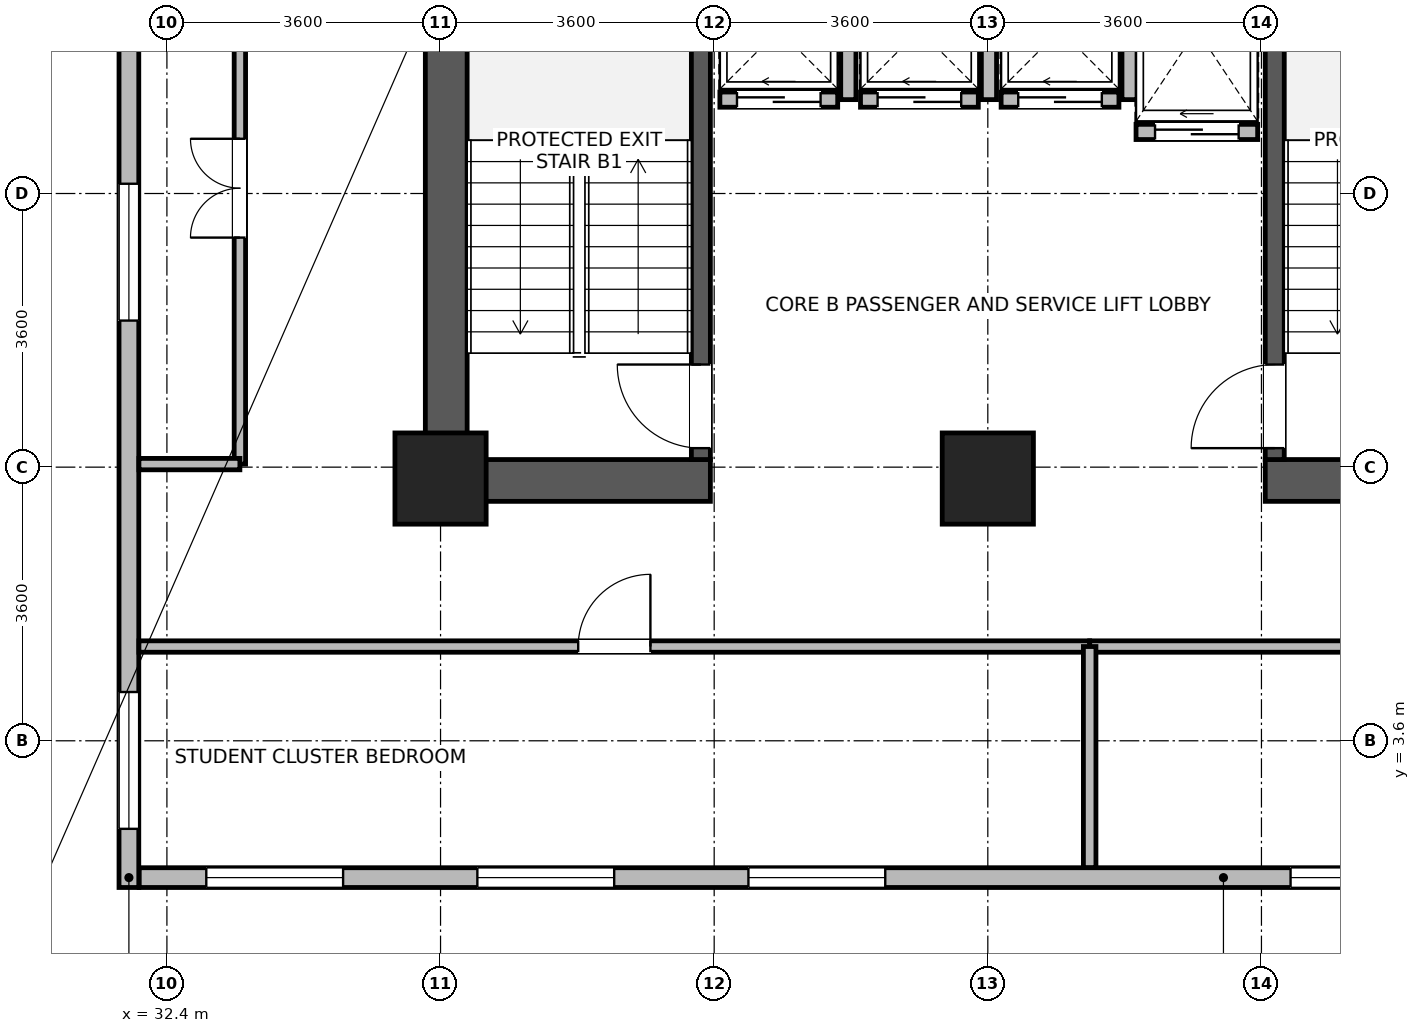
"""IFC4 building model, lengths in metres.
Left out: names, types, materials, properties, quantities, classifications, styles, units other than length and angle.
Written with IfcOpenShell. Run it as: python <this file> out.ifc"""

import sys

from ifc_helpers import new_model, si_unit, direction, frame, frame_2d, origin, origin_2d, place, context, subcontext, project, spatial, rectangle, extrude, source, transform, mapped, element, fill, save


model = new_model("IFC4")
c1 = context("Model", 3, precision=1e-05, world=origin(), true_north=direction((0.0, 1.0)))
c2 = subcontext(c1, "Body", "Model", "MODEL_VIEW")
j1 = project(units=[si_unit("LENGTHUNIT", "METRE"), si_unit("PLANEANGLEUNIT", "RADIAN")], contexts=[c1])
p1 = place(None, origin())
s1 = spatial("IfcSite", under=j1, at=p1, CompositionType="ELEMENT")
p2 = place(p1, origin())
s2 = spatial("IfcBuilding", under=s1, at=p2, CompositionType="ELEMENT")
p3 = place(p2, frame((0.0, 0.0, 89.7)))
s3 = spatial("IfcBuildingStorey", under=s2, at=p3, CompositionType="ELEMENT", Elevation=89.7)
p4 = place(p3, frame((36.075, 6.75, 0.0), z_axis=(0.0, 0.0, 1.0), x_axis=(0.0, 1.0, 0.0)))
e1 = element("IfcWall", 1, at=p4, inside=s3, PredefinedType="SHEAR", context=c2, shape_type="SweptSolid", body=[
    extrude(rectangle(XDim=8.1, YDim=0.55, at=frame_2d((4.05, 0.0))), origin(), (0.0, 0.0, 1.0), 3.45),
])
for number, where, z_axis, x_axis in (
    (2, (36.35, 7.025, 0.0), (0.0, 0.0, 1.0), (1.0, 0.0, 0.0)),
    (3, (46.85, 7.025, 0.0), (0.0, 0.0, 1.0), (1.0, 0.0, 0.0)),
):
    element("IfcWall", number, at=place(p3, frame(where, z_axis=z_axis, x_axis=x_axis)), inside=s3, PredefinedType="SHEAR", context=c2, shape_type="SweptSolid", body=[
        extrude(rectangle(XDim=3.2, YDim=0.55, at=frame_2d((1.6, 0.0))), origin(), (0.0, 0.0, 1.0), 3.45),
    ])
p5 = place(p3, frame((39.425, 7.3, 0.0), z_axis=(0.0, 0.0, 1.0), x_axis=(0.0, 1.0, 0.0)))
e4 = element("IfcWall", 4, at=p5, inside=s3, PredefinedType="SHEAR", context=c2, shape_type="SweptSolid", body=[
    extrude(rectangle(XDim=7.0, YDim=0.25, at=frame_2d((3.5, 0.0))), origin(), (0.0, 0.0, 1.0), 3.45),
])
p6 = place(p5, frame((0.15, 0.0, 0.0)))
e5 = element("IfcOpeningElement", 5, at=p6, cuts=e4, PredefinedType="OPENING", context=c2, shape_type="SweptSolid", body=[
    extrude(rectangle(XDim=1.1, YDim=2.08, at=frame_2d((0.55, 1.04))), frame((0.0, 0.135, 0.0), z_axis=(0.0, -1.0, 0.0), x_axis=(1.0, 0.0, 0.0)), (0.0, 0.0, 1.0), 0.27),
])
p7 = place(p3, frame((46.975, 7.3, 0.0), z_axis=(0.0, 0.0, 1.0), x_axis=(0.0, 1.0, 0.0)))
e6 = element("IfcWall", 6, at=p7, inside=s3, PredefinedType="SHEAR", context=c2, shape_type="SweptSolid", body=[
    extrude(rectangle(XDim=7.0, YDim=0.25, at=frame_2d((3.5, 0.0))), origin(), (0.0, 0.0, 1.0), 3.45),
])
p8 = place(p7, frame((0.15, 0.0, 0.0)))
e7 = element("IfcOpeningElement", 7, at=p8, cuts=e6, PredefinedType="OPENING", context=c2, shape_type="SweptSolid", body=[
    extrude(rectangle(XDim=1.1, YDim=2.08, at=frame_2d((0.55, 1.04))), frame((0.0, 0.135, 0.0), z_axis=(0.0, -1.0, 0.0), x_axis=(1.0, 0.0, 0.0)), (0.0, 0.0, 1.0), 0.27),
])
m1 = source(origin(), c2, "Body", "SweptSolid", [
    extrude(rectangle(XDim=1.2, YDim=1.2, at=origin_2d()), origin(), (0.0, 0.0, 1.0), 3.7),
])
for number, where, z_axis, x_axis in (
    (8, (36.0, 7.05, 0.0), (0.0, 0.0, 1.0), (1.0, 0.0, 0.0)),
    (9, (43.2, 7.05, 0.0), (0.0, 0.0, 1.0), (1.0, 0.0, 0.0)),
):
    element("IfcColumn", number, at=place(p3, frame(where, z_axis=z_axis, x_axis=x_axis)), inside=s3, PredefinedType="COLUMN", context=c2, shape_type="MappedRepresentation", body=[
        mapped(m1, transform((0.0, 0.0, 0.0), x_axis=(1.0, 0.0, 0.0), y_axis=(0.0, 1.0, 0.0), z_axis=(0.0, 0.0, 1.0), scale=1.0)),
    ])
p9 = place(p3, frame((60.565, 1.8, 0.0), z_axis=(0.0, 0.0, 1.0), x_axis=(-1.0, 0.0, 0.0)))
e10 = element("IfcWall", 10, at=p9, inside=s3, PredefinedType="STANDARD", context=c2, shape_type="SweptSolid", body=[
    extrude(rectangle(XDim=28.53, YDim=0.26, at=frame_2d((14.265, 0.0))), origin(), (0.0, 0.0, 1.0), 3.43),
])
p10 = place(p9, frame((4.449, 0.0, 0.85)))
e11 = element("IfcOpeningElement", 11, at=p10, cuts=e10, PredefinedType="OPENING", context=c2, shape_type="SweptSolid", body=[
    extrude(rectangle(XDim=1.8, YDim=1.85, at=frame_2d((0.9, 0.925))), frame((0.0, 0.14, 0.0), z_axis=(0.0, -1.0, 0.0), x_axis=(1.0, 0.0, 0.0)), (0.0, 0.0, 1.0), 0.28),
])
p11 = place(p9, frame((8.016, 0.0, 0.85)))
e12 = element("IfcOpeningElement", 12, at=p11, cuts=e10, PredefinedType="OPENING", context=c2, shape_type="SweptSolid", body=[
    extrude(rectangle(XDim=1.8, YDim=1.85, at=frame_2d((0.9, 0.925))), frame((0.0, 0.14, 0.0), z_axis=(0.0, -1.0, 0.0), x_axis=(1.0, 0.0, 0.0)), (0.0, 0.0, 1.0), 0.28),
])
p12 = place(p9, frame((11.582, 0.0, 0.85)))
e13 = element("IfcOpeningElement", 13, at=p12, cuts=e10, PredefinedType="OPENING", context=c2, shape_type="SweptSolid", body=[
    extrude(rectangle(XDim=1.8, YDim=1.85, at=frame_2d((0.9, 0.925))), frame((0.0, 0.14, 0.0), z_axis=(0.0, -1.0, 0.0), x_axis=(1.0, 0.0, 0.0)), (0.0, 0.0, 1.0), 0.28),
])
p13 = place(p9, frame((18.714, 0.0, 0.85)))
e14 = element("IfcOpeningElement", 14, at=p13, cuts=e10, PredefinedType="OPENING", context=c2, shape_type="SweptSolid", body=[
    extrude(rectangle(XDim=1.8, YDim=1.85, at=frame_2d((0.9, 0.925))), frame((0.0, 0.14, 0.0), z_axis=(0.0, -1.0, 0.0), x_axis=(1.0, 0.0, 0.0)), (0.0, 0.0, 1.0), 0.28),
])
p14 = place(p9, frame((22.281, 0.0, 0.85)))
e15 = element("IfcOpeningElement", 15, at=p14, cuts=e10, PredefinedType="OPENING", context=c2, shape_type="SweptSolid", body=[
    extrude(rectangle(XDim=1.8, YDim=1.85, at=frame_2d((0.9, 0.925))), frame((0.0, 0.14, 0.0), z_axis=(0.0, -1.0, 0.0), x_axis=(1.0, 0.0, 0.0)), (0.0, 0.0, 1.0), 0.28),
])
p15 = place(p9, frame((25.847, 0.0, 0.85)))
e16 = element("IfcOpeningElement", 16, at=p15, cuts=e10, PredefinedType="OPENING", context=c2, shape_type="SweptSolid", body=[
    extrude(rectangle(XDim=1.8, YDim=1.85, at=frame_2d((0.9, 0.925))), frame((0.0, 0.14, 0.0), z_axis=(0.0, -1.0, 0.0), x_axis=(1.0, 0.0, 0.0)), (0.0, 0.0, 1.0), 0.28),
])
p16 = place(p3, frame((31.9, 1.67, 0.0), z_axis=(0.0, 0.0, 1.0), x_axis=(0.0, 1.0, 0.0)))
e17 = element("IfcWall", 17, at=p16, inside=s3, PredefinedType="STANDARD", context=c2, shape_type="SweptSolid", body=[
    extrude(rectangle(XDim=20.06, YDim=0.26, at=frame_2d((10.03, 0.0))), origin(), (0.0, 0.0, 1.0), 3.43),
])
p17 = place(p16, frame((0.772, 0.0, 0.85)))
e18 = element("IfcOpeningElement", 18, at=p17, cuts=e17, PredefinedType="OPENING", context=c2, shape_type="SweptSolid", body=[
    extrude(rectangle(XDim=1.8, YDim=1.85, at=frame_2d((0.9, 0.925))), frame((0.0, 0.14, 0.0), z_axis=(0.0, -1.0, 0.0), x_axis=(1.0, 0.0, 0.0)), (0.0, 0.0, 1.0), 0.28),
])
p18 = place(p16, frame((7.458, 0.0, 0.85)))
e19 = element("IfcOpeningElement", 19, at=p18, cuts=e17, PredefinedType="OPENING", context=c2, shape_type="SweptSolid", body=[
    extrude(rectangle(XDim=1.8, YDim=1.85, at=frame_2d((0.9, 0.925))), frame((0.0, 0.14, 0.0), z_axis=(0.0, -1.0, 0.0), x_axis=(1.0, 0.0, 0.0)), (0.0, 0.0, 1.0), 0.28),
])
p19 = place(p16, frame((14.145, 0.0, 0.85)))
e20 = element("IfcOpeningElement", 20, at=p19, cuts=e17, PredefinedType="OPENING", context=c2, shape_type="SweptSolid", body=[
    extrude(rectangle(XDim=1.8, YDim=1.85, at=frame_2d((0.9, 0.925))), frame((0.0, 0.14, 0.0), z_axis=(0.0, -1.0, 0.0), x_axis=(1.0, 0.0, 0.0)), (0.0, 0.0, 1.0), 0.28),
])
p20 = place(p16, frame((17.488, 0.0, 0.85)))
e21 = element("IfcOpeningElement", 21, at=p20, cuts=e17, PredefinedType="OPENING", context=c2, shape_type="SweptSolid", body=[
    extrude(rectangle(XDim=1.8, YDim=1.85, at=frame_2d((0.9, 0.925))), frame((0.0, 0.14, 0.0), z_axis=(0.0, -1.0, 0.0), x_axis=(1.0, 0.0, 0.0)), (0.0, 0.0, 1.0), 0.28),
])
p21 = place(p3, frame((39.675, 12.035, 0.0), z_axis=(0.0, 0.0, 1.0), x_axis=(1.0, 0.0, 0.0)))
e22 = element("IfcWall", 22, at=p21, inside=s3, PredefinedType="PARTITIONING", context=c2, shape_type="SweptSolid", body=[
    extrude(rectangle(XDim=1.55, YDim=0.2, at=frame_2d((0.775, 0.0))), origin(), (0.0, 0.0, 1.0), 3.43),
])
p22 = place(p21, frame((0.225, 0.0, 0.0)))
e23 = element("IfcOpeningElement", 23, at=p22, cuts=e22, PredefinedType="OPENING", context=c2, shape_type="SweptSolid", body=[
    extrude(rectangle(XDim=1.1, YDim=2.12, at=frame_2d((0.55, 1.06))), frame((0.0, 0.11, 0.0), z_axis=(0.0, -1.0, 0.0), x_axis=(1.0, 0.0, 0.0)), (0.0, 0.0, 1.0), 0.22),
])
p23 = place(p3, frame((41.365, 12.035, 0.0), z_axis=(0.0, 0.0, 1.0), x_axis=(0.0, 1.0, 0.0)))
e24 = element("IfcWall", 24, at=p23, inside=s3, PredefinedType="PARTITIONING", context=c2, shape_type="SweptSolid", body=[
    extrude(rectangle(XDim=1.83, YDim=0.2, at=frame_2d((0.915, 0.0))), origin(), (0.0, 0.0, 1.0), 3.43),
])
p24 = place(p3, frame((41.525, 12.035, 0.0), z_axis=(0.0, 0.0, 1.0), x_axis=(1.0, 0.0, 0.0)))
e25 = element("IfcWall", 25, at=p24, inside=s3, PredefinedType="PARTITIONING", context=c2, shape_type="SweptSolid", body=[
    extrude(rectangle(XDim=1.55, YDim=0.2, at=frame_2d((0.775, 0.0))), origin(), (0.0, 0.0, 1.0), 3.43),
])
p25 = place(p24, frame((0.225, 0.0, 0.0)))
e26 = element("IfcOpeningElement", 26, at=p25, cuts=e25, PredefinedType="OPENING", context=c2, shape_type="SweptSolid", body=[
    extrude(rectangle(XDim=1.1, YDim=2.12, at=frame_2d((0.55, 1.06))), frame((0.0, 0.11, 0.0), z_axis=(0.0, -1.0, 0.0), x_axis=(1.0, 0.0, 0.0)), (0.0, 0.0, 1.0), 0.22),
])
p26 = place(p3, frame((43.215, 12.035, 0.0), z_axis=(0.0, 0.0, 1.0), x_axis=(0.0, 1.0, 0.0)))
e27 = element("IfcWall", 27, at=p26, inside=s3, PredefinedType="PARTITIONING", context=c2, shape_type="SweptSolid", body=[
    extrude(rectangle(XDim=1.83, YDim=0.2, at=frame_2d((0.915, 0.0))), origin(), (0.0, 0.0, 1.0), 3.43),
])
p27 = place(p3, frame((43.375, 12.035, 0.0), z_axis=(0.0, 0.0, 1.0), x_axis=(1.0, 0.0, 0.0)))
e28 = element("IfcWall", 28, at=p27, inside=s3, PredefinedType="PARTITIONING", context=c2, shape_type="SweptSolid", body=[
    extrude(rectangle(XDim=1.55, YDim=0.2, at=frame_2d((0.775, 0.0))), origin(), (0.0, 0.0, 1.0), 3.43),
])
p28 = place(p27, frame((0.225, 0.0, 0.0)))
e29 = element("IfcOpeningElement", 29, at=p28, cuts=e28, PredefinedType="OPENING", context=c2, shape_type="SweptSolid", body=[
    extrude(rectangle(XDim=1.1, YDim=2.12, at=frame_2d((0.55, 1.06))), frame((0.0, 0.11, 0.0), z_axis=(0.0, -1.0, 0.0), x_axis=(1.0, 0.0, 0.0)), (0.0, 0.0, 1.0), 0.22),
])
p29 = place(p3, frame((45.065, 12.035, 0.0), z_axis=(0.0, 0.0, 1.0), x_axis=(0.0, 1.0, 0.0)))
e30 = element("IfcWall", 30, at=p29, inside=s3, PredefinedType="PARTITIONING", context=c2, shape_type="SweptSolid", body=[
    extrude(rectangle(XDim=1.83, YDim=0.2, at=frame_2d((0.915, 0.0))), origin(), (0.0, 0.0, 1.0), 3.43),
])
p30 = place(p3, frame((45.15, 11.61, 0.0), z_axis=(0.0, 0.0, 1.0), x_axis=(1.0, 0.0, 0.0)))
e31 = element("IfcWall", 31, at=p30, inside=s3, PredefinedType="PARTITIONING", context=c2, shape_type="SweptSolid", body=[
    extrude(rectangle(XDim=1.6, YDim=0.2, at=frame_2d((0.8, 0.0))), origin(), (0.0, 0.0, 1.0), 3.43),
])
p31 = place(p30, frame((0.25, 0.0, 0.0)))
e32 = element("IfcOpeningElement", 32, at=p31, cuts=e31, PredefinedType="OPENING", context=c2, shape_type="SweptSolid", body=[
    extrude(rectangle(XDim=1.1, YDim=2.12, at=frame_2d((0.55, 1.06))), frame((0.0, 0.11, 0.0), z_axis=(0.0, -1.0, 0.0), x_axis=(1.0, 0.0, 0.0)), (0.0, 0.0, 1.0), 0.22),
])
p32 = place(p3, frame((44.54, 4.84, 0.0), z_axis=(0.0, 0.0, 1.0), x_axis=(1.0, 0.0, 0.0)))
e33 = element("IfcWall", 33, at=p32, inside=s3, PredefinedType="PARTITIONING", context=c2, shape_type="SweptSolid", body=[
    extrude(rectangle(XDim=13.62, YDim=0.15, at=frame_2d((6.81, 0.0))), origin(), (0.0, 0.0, 1.0), 3.43),
])
p33 = place(p32, frame((6.335, 0.0, 0.0)))
e34 = element("IfcOpeningElement", 34, at=p33, cuts=e33, PredefinedType="OPENING", context=c2, shape_type="SweptSolid", body=[
    extrude(rectangle(XDim=0.95, YDim=2.1, at=frame_2d((0.475, 1.05))), frame((0.0, 0.085, 0.0), z_axis=(0.0, -1.0, 0.0), x_axis=(1.0, 0.0, 0.0)), (0.0, 0.0, 1.0), 0.17),
])
p34 = place(p3, frame((32.032, 4.84, 0.0), z_axis=(0.0, 0.0, 1.0), x_axis=(1.0, 0.0, 0.0)))
e35 = element("IfcWall", 35, at=p34, inside=s3, PredefinedType="PARTITIONING", context=c2, shape_type="SweptSolid", body=[
    extrude(rectangle(XDim=12.508, YDim=0.15, at=frame_2d((6.254, 0.0))), origin(), (0.0, 0.0, 1.0), 3.43),
])
p35 = place(p34, frame((5.779, 0.0, 0.0)))
e36 = element("IfcOpeningElement", 36, at=p35, cuts=e35, PredefinedType="OPENING", context=c2, shape_type="SweptSolid", body=[
    extrude(rectangle(XDim=0.95, YDim=2.1, at=frame_2d((0.475, 1.05))), frame((0.0, 0.085, 0.0), z_axis=(0.0, -1.0, 0.0), x_axis=(1.0, 0.0, 0.0)), (0.0, 0.0, 1.0), 0.17),
])
p36 = place(p3, frame((33.36, 7.24, 0.0), z_axis=(0.0, 0.0, 1.0), x_axis=(0.0, 1.0, 0.0)))
e37 = element("IfcWall", 37, at=p36, inside=s3, PredefinedType="PARTITIONING", context=c2, shape_type="SweptSolid", body=[
    extrude(rectangle(XDim=7.26, YDim=0.15, at=frame_2d((3.63, 0.0))), origin(), (0.0, 0.0, 1.0), 3.43),
])
p37 = place(p36, frame((2.98, 0.0, 0.0)))
e38 = element("IfcOpeningElement", 38, at=p37, cuts=e37, PredefinedType="OPENING", context=c2, shape_type="SweptSolid", body=[
    extrude(rectangle(XDim=1.3, YDim=2.12, at=frame_2d((0.65, 1.06))), frame((0.0, 0.085, 0.0), z_axis=(0.0, -1.0, 0.0), x_axis=(1.0, 0.0, 0.0)), (0.0, 0.0, 1.0), 0.17),
])
p38 = place(p3, frame((32.032, 7.24, 0.0), z_axis=(0.0, 0.0, 1.0), x_axis=(1.0, 0.0, 0.0)))
e39 = element("IfcWall", 39, at=p38, inside=s3, PredefinedType="PARTITIONING", context=c2, shape_type="SweptSolid", body=[
    extrude(rectangle(XDim=1.328, YDim=0.15, at=frame_2d((0.664, 0.0))), origin(), (0.0, 0.0, 1.0), 3.43),
])
p39 = place(p3, frame((44.54, 1.932, 0.0), z_axis=(0.0, 0.0, 1.0), x_axis=(0.0, 1.0, 0.0)))
e40 = element("IfcWall", 40, at=p39, inside=s3, PredefinedType="PARTITIONING", context=c2, shape_type="SweptSolid", body=[
    extrude(rectangle(XDim=2.908, YDim=0.165, at=frame_2d((1.454, 0.0))), origin(), (0.0, 0.0, 1.0), 3.43),
])
p40 = place(p12, origin())
e41 = element("IfcWindow", 41, at=p40, inside=s3, PartitioningType="SINGLE_PANEL", PredefinedType="WINDOW", context=c2, shape_type="SweptSolid", body=[
    extrude(rectangle(XDim=1.8, YDim=1.85, at=frame_2d((0.9, 0.925))), frame((0.0, 0.03, 0.0), z_axis=(0.0, -1.0, 0.0), x_axis=(1.0, 0.0, 0.0)), (0.0, 0.0, 1.0), 0.06),
])
fill(e13, e41)
p41 = place(p13, origin())
e42 = element("IfcWindow", 42, at=p41, inside=s3, PartitioningType="SINGLE_PANEL", PredefinedType="WINDOW", context=c2, shape_type="SweptSolid", body=[
    extrude(rectangle(XDim=1.8, YDim=1.85, at=frame_2d((0.9, 0.925))), frame((0.0, 0.03, 0.0), z_axis=(0.0, -1.0, 0.0), x_axis=(1.0, 0.0, 0.0)), (0.0, 0.0, 1.0), 0.06),
])
fill(e14, e42)
p42 = place(p14, origin())
e43 = element("IfcWindow", 43, at=p42, inside=s3, PartitioningType="SINGLE_PANEL", PredefinedType="WINDOW", context=c2, shape_type="SweptSolid", body=[
    extrude(rectangle(XDim=1.8, YDim=1.85, at=frame_2d((0.9, 0.925))), frame((0.0, 0.03, 0.0), z_axis=(0.0, -1.0, 0.0), x_axis=(1.0, 0.0, 0.0)), (0.0, 0.0, 1.0), 0.06),
])
fill(e15, e43)
p43 = place(p15, origin())
e44 = element("IfcWindow", 44, at=p43, inside=s3, PartitioningType="SINGLE_PANEL", PredefinedType="WINDOW", context=c2, shape_type="SweptSolid", body=[
    extrude(rectangle(XDim=1.8, YDim=1.85, at=frame_2d((0.9, 0.925))), frame((0.0, 0.03, 0.0), z_axis=(0.0, -1.0, 0.0), x_axis=(1.0, 0.0, 0.0)), (0.0, 0.0, 1.0), 0.06),
])
fill(e16, e44)
p44 = place(p17, origin())
e45 = element("IfcWindow", 45, at=p44, inside=s3, PartitioningType="SINGLE_PANEL", PredefinedType="WINDOW", context=c2, shape_type="SweptSolid", body=[
    extrude(rectangle(XDim=1.8, YDim=1.85, at=frame_2d((0.9, 0.925))), frame((0.0, 0.03, 0.0), z_axis=(0.0, -1.0, 0.0), x_axis=(1.0, 0.0, 0.0)), (0.0, 0.0, 1.0), 0.06),
])
fill(e18, e45)
p45 = place(p18, origin())
e46 = element("IfcWindow", 46, at=p45, inside=s3, PartitioningType="SINGLE_PANEL", PredefinedType="WINDOW", context=c2, shape_type="SweptSolid", body=[
    extrude(rectangle(XDim=1.8, YDim=1.85, at=frame_2d((0.9, 0.925))), frame((0.0, 0.03, 0.0), z_axis=(0.0, -1.0, 0.0), x_axis=(1.0, 0.0, 0.0)), (0.0, 0.0, 1.0), 0.06),
])
fill(e19, e46)
p46 = place(p6, origin())
e47 = element("IfcDoor", 47, at=p46, inside=s3, OperationType="SINGLE_SWING_RIGHT", PredefinedType="DOOR", context=c2, shape_type="SweptSolid", body=[
    extrude(rectangle(XDim=1.1, YDim=2.08, at=frame_2d((0.55, 1.04))), frame((0.0, 0.025, 0.0), z_axis=(0.0, -1.0, 0.0), x_axis=(1.0, 0.0, 0.0)), (0.0, 0.0, 1.0), 0.05),
])
fill(e5, e47)
p47 = place(p8, origin())
e48 = element("IfcDoor", 48, at=p47, inside=s3, OperationType="SINGLE_SWING_LEFT", PredefinedType="DOOR", context=c2, shape_type="SweptSolid", body=[
    extrude(rectangle(XDim=1.1, YDim=2.08, at=frame_2d((0.55, 1.04))), frame((0.0, 0.025, 0.0), z_axis=(0.0, -1.0, 0.0), x_axis=(1.0, 0.0, 0.0)), (0.0, 0.0, 1.0), 0.05),
])
fill(e7, e48)
p48 = place(p22, origin())
e49 = element("IfcDoor", 49, at=p48, inside=s3, OperationType="SLIDING_TO_LEFT", PredefinedType="DOOR", context=c2, shape_type="SweptSolid", body=[
    extrude(rectangle(XDim=1.1, YDim=2.12, at=frame_2d((0.55, 1.06))), frame((0.0, 0.025, 0.0), z_axis=(0.0, -1.0, 0.0), x_axis=(1.0, 0.0, 0.0)), (0.0, 0.0, 1.0), 0.05),
])
fill(e23, e49)
p49 = place(p25, origin())
e50 = element("IfcDoor", 50, at=p49, inside=s3, OperationType="SLIDING_TO_LEFT", PredefinedType="DOOR", context=c2, shape_type="SweptSolid", body=[
    extrude(rectangle(XDim=1.1, YDim=2.12, at=frame_2d((0.55, 1.06))), frame((0.0, 0.025, 0.0), z_axis=(0.0, -1.0, 0.0), x_axis=(1.0, 0.0, 0.0)), (0.0, 0.0, 1.0), 0.05),
])
fill(e26, e50)
p50 = place(p28, origin())
e51 = element("IfcDoor", 51, at=p50, inside=s3, OperationType="SLIDING_TO_LEFT", PredefinedType="DOOR", context=c2, shape_type="SweptSolid", body=[
    extrude(rectangle(XDim=1.1, YDim=2.12, at=frame_2d((0.55, 1.06))), frame((0.0, 0.025, 0.0), z_axis=(0.0, -1.0, 0.0), x_axis=(1.0, 0.0, 0.0)), (0.0, 0.0, 1.0), 0.05),
])
fill(e29, e51)
p51 = place(p31, origin())
e52 = element("IfcDoor", 52, at=p51, inside=s3, OperationType="SLIDING_TO_LEFT", PredefinedType="DOOR", context=c2, shape_type="SweptSolid", body=[
    extrude(rectangle(XDim=1.1, YDim=2.12, at=frame_2d((0.55, 1.06))), frame((0.0, 0.025, 0.0), z_axis=(0.0, -1.0, 0.0), x_axis=(1.0, 0.0, 0.0)), (0.0, 0.0, 1.0), 0.05),
])
fill(e32, e52)
p52 = place(p35, origin())
e53 = element("IfcDoor", 53, at=p52, inside=s3, OperationType="SINGLE_SWING_RIGHT", PredefinedType="DOOR", context=c2, shape_type="SweptSolid", body=[
    extrude(rectangle(XDim=0.95, YDim=2.1, at=frame_2d((0.475, 1.05))), frame((0.0, 0.025, 0.0), z_axis=(0.0, -1.0, 0.0), x_axis=(1.0, 0.0, 0.0)), (0.0, 0.0, 1.0), 0.05),
])
fill(e36, e53)
p53 = place(p37, origin())
e54 = element("IfcDoor", 54, at=p53, inside=s3, OperationType="DOUBLE_DOOR_SINGLE_SWING", PredefinedType="DOOR", context=c2, shape_type="SweptSolid", body=[
    extrude(rectangle(XDim=1.3, YDim=2.12, at=frame_2d((0.65, 1.06))), frame((0.0, 0.025, 0.0), z_axis=(0.0, -1.0, 0.0), x_axis=(1.0, 0.0, 0.0)), (0.0, 0.0, 1.0), 0.05),
])
fill(e38, e54)
save(model, sys.argv[1])
